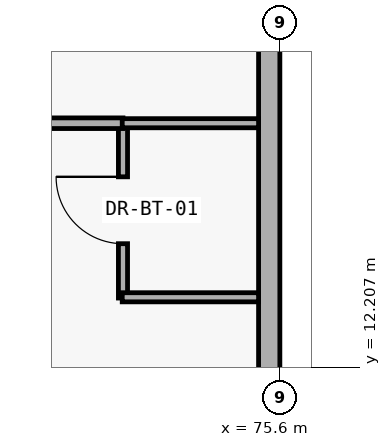
"""IFC4 building model, lengths in metres.
Left out: names, types, materials, properties, quantities, classifications, styles, units other than length and angle.
Written with IfcOpenShell. Run it as: python <this file> out.ifc"""

import sys

from ifc_helpers import new_model, si_unit, direction, frame, frame_2d, origin, place, context, subcontext, project, spatial, rectangle, extrude, element, fill, save


model = new_model("IFC4")
c1 = context("Model", 3, precision=1e-05, world=origin(), true_north=direction((0.0, 1.0)))
c2 = subcontext(c1, "Body", "Model", "MODEL_VIEW")
j1 = project(units=[si_unit("LENGTHUNIT", "METRE"), si_unit("PLANEANGLEUNIT", "RADIAN")], contexts=[c1])
p1 = place(None, origin())
s1 = spatial("IfcSite", under=j1, at=p1, CompositionType="ELEMENT")
p2 = place(p1, origin())
s2 = spatial("IfcBuilding", under=s1, at=p2, CompositionType="ELEMENT")
p3 = place(p2, frame((0.0, 0.0, 33.6)))
s3 = spatial("IfcBuildingStorey", under=s2, at=p3, CompositionType="ELEMENT", Elevation=33.6)
p4 = place(p3, frame((75.46, 34.0, 0.0), z_axis=(0.0, 0.0, 1.0), x_axis=(0.0, -1.0, 0.0)))
e1 = element("IfcWall", 1, at=p4, inside=s3, PredefinedType="SOLIDWALL", context=c2, shape_type="SweptSolid", body=[
    extrude(rectangle(XDim=25.2, YDim=0.28, at=frame_2d((12.6, 0.0))), origin(), (0.0, 0.0, 1.0), 3.34),
])
p5 = place(p4, frame((21.9, 0.0, 0.95)))
e2 = element("IfcOpeningElement", 2, at=p5, cuts=e1, PredefinedType="OPENING", context=c2, shape_type="SweptSolid", body=[
    extrude(rectangle(XDim=1.6, YDim=1.6, at=frame_2d((0.8, 0.8))), frame((0.0, 0.15, 0.0), z_axis=(0.0, -1.0, 0.0), x_axis=(1.0, 0.0, 0.0)), (0.0, 0.0, 1.0), 0.3),
])
p6 = place(p3, frame((73.536, 13.12, 0.0), z_axis=(0.0, 0.0, 1.0), x_axis=(0.0, 1.0, 0.0)))
e3 = element("IfcWall", 3, at=p6, inside=s3, PredefinedType="PARTITIONING", context=c2, shape_type="SweptSolid", body=[
    extrude(rectangle(XDim=2.31, YDim=0.12, at=frame_2d((1.155, 0.0))), origin(), (0.0, 0.0, 1.0), 2.48),
])
p7 = place(p6, frame((0.715, 0.0, 0.0)))
e4 = element("IfcOpeningElement", 4, at=p7, cuts=e3, PredefinedType="OPENING", context=c2, shape_type="SweptSolid", body=[
    extrude(rectangle(XDim=0.88, YDim=2.15, at=frame_2d((0.44, 1.075))), frame((0.0, 0.07, 0.0), z_axis=(0.0, -1.0, 0.0), x_axis=(1.0, 0.0, 0.0)), (0.0, 0.0, 1.0), 0.14),
])
p8 = place(p3, frame((70.664, 15.42, 0.0), z_axis=(0.0, 0.0, 1.0), x_axis=(1.0, 0.0, 0.0)))
e5 = element("IfcWall", 5, at=p8, inside=s3, PredefinedType="PARTITIONING", context=c2, shape_type="SweptSolid", body=[
    extrude(rectangle(XDim=2.872, YDim=0.14, at=frame_2d((1.436, 0.0))), origin(), (0.0, 0.0, 1.0), 2.48),
])
p9 = place(p8, frame((0.839, 0.0, 0.0)))
e6 = element("IfcOpeningElement", 6, at=p9, cuts=e5, PredefinedType="OPENING", context=c2, shape_type="SweptSolid", body=[
    extrude(rectangle(XDim=0.96, YDim=2.25, at=frame_2d((0.48, 1.125))), frame((0.0, 0.08, 0.0), z_axis=(0.0, -1.0, 0.0), x_axis=(1.0, 0.0, 0.0)), (0.0, 0.0, 1.0), 0.16),
])
for number, where, z_axis, x_axis in (
    (7, (73.526, 13.13, 0.0), (0.0, 0.0, 1.0), (1.0, 0.0, 0.0)),
    (8, (73.526, 15.42, 0.0), (0.0, 0.0, 1.0), (1.0, 0.0, 0.0)),
):
    element("IfcWall", number, at=place(p3, frame(where, z_axis=z_axis, x_axis=x_axis)), inside=s3, PredefinedType="PARTITIONING", context=c2, shape_type="SweptSolid", body=[
        extrude(rectangle(XDim=1.794, YDim=0.12, at=frame_2d((0.897, 0.0))), origin(), (0.0, 0.0, 1.0), 2.48),
    ])
p10 = place(p7, origin())
e9 = element("IfcDoor", 9, at=p10, inside=s3, OperationType="SINGLE_SWING_RIGHT", PredefinedType="DOOR", context=c2, shape_type="SweptSolid", body=[
    extrude(rectangle(XDim=0.88, YDim=2.15, at=frame_2d((0.44, 1.075))), frame((0.0, 0.025, 0.0), z_axis=(0.0, -1.0, 0.0), x_axis=(1.0, 0.0, 0.0)), (0.0, 0.0, 1.0), 0.05),
])
fill(e4, e9)
save(model, sys.argv[1])
